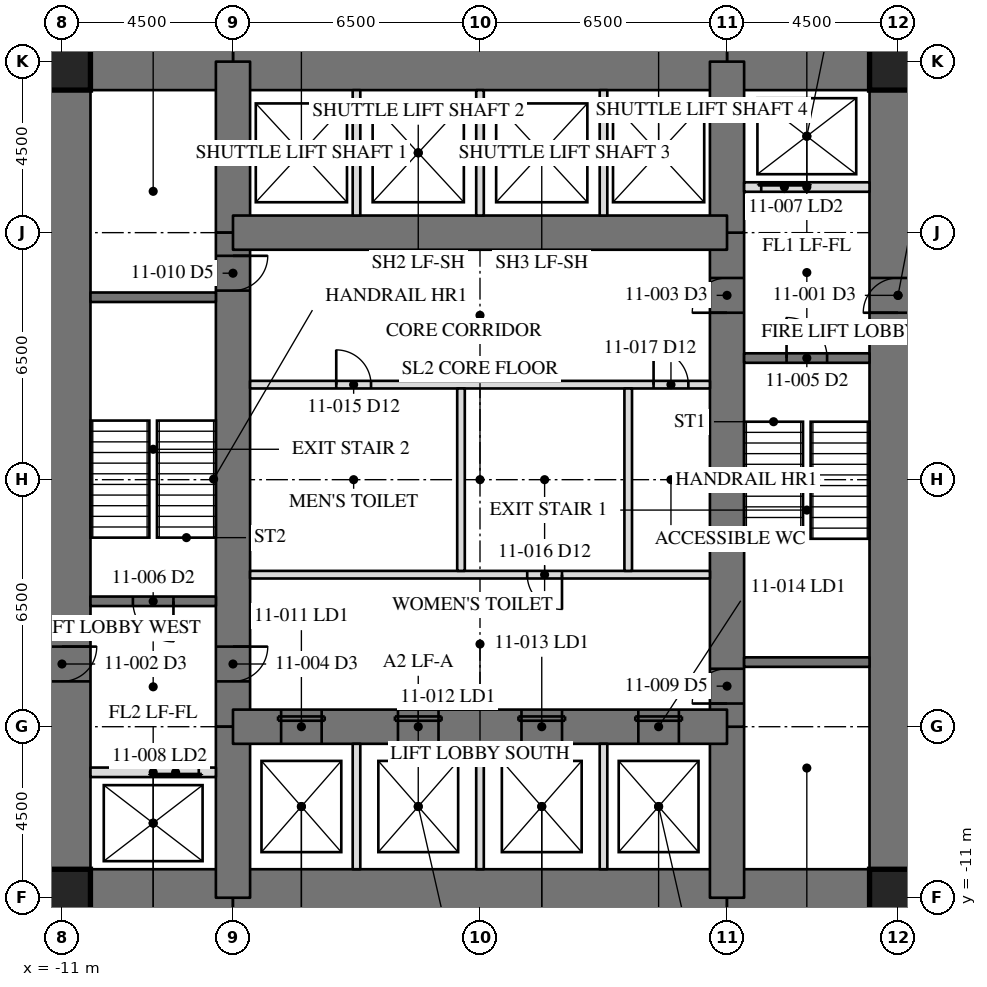
"""IFC4 building model, lengths in metres.
Left out: names, types, materials, properties, quantities, classifications, styles, units other than length and angle.
Written with IfcOpenShell. Run it as: python <this file> out.ifc"""

import sys

from ifc_helpers import new_model, si_unit, direction, frame, frame_2d, origin, origin_2d, place, context, subcontext, project, spatial, rectangle, hollow_rectangle, extrude, element, fill, save


model = new_model("IFC4")
c1 = context("Model", 3, precision=1e-05, world=origin(), true_north=direction((0.0, 1.0)))
c2 = subcontext(c1, "Body", "Model", "MODEL_VIEW")
j1 = project(units=[si_unit("LENGTHUNIT", "METRE"), si_unit("PLANEANGLEUNIT", "RADIAN")], contexts=[c1])
p1 = place(None, origin())
s1 = spatial("IfcSite", under=j1, at=p1, CompositionType="ELEMENT")
p2 = place(p1, origin())
s2 = spatial("IfcBuilding", under=s1, at=p2, CompositionType="ELEMENT")
p3 = place(p2, frame((0.0, 0.0, 48.8)))
s3 = spatial("IfcBuildingStorey", under=s2, at=p3, CompositionType="ELEMENT", Elevation=48.8)
p4 = place(p3, frame((11.0, -11.0, 0.0), z_axis=(0.0, 0.0, 1.0), x_axis=(0.0, 1.0, 0.0)))
e1 = element("IfcWall", 1, at=p4, inside=s3, PredefinedType="SHEAR", context=c2, shape_type="SweptSolid", body=[
    extrude(rectangle(XDim=22.0, YDim=1.5, at=frame_2d((11.0, 0.0))), origin(), (0.0, 0.0, 1.0), 4.1),
])
p5 = place(p4, frame((15.393, 0.0, 0.0)))
e2 = element("IfcOpeningElement", 2, at=p5, cuts=e1, PredefinedType="OPENING", context=c2, shape_type="SweptSolid", body=[
    extrude(rectangle(XDim=0.915, YDim=2.134, at=frame_2d((0.458, 1.067))), frame((0.0, 0.76, 0.0), z_axis=(0.0, -1.0, 0.0), x_axis=(1.0, 0.0, 0.0)), (0.0, 0.0, 1.0), 1.52),
])
p6 = place(p3, frame((-11.0, 11.0, 0.0), z_axis=(0.0, 0.0, 1.0), x_axis=(0.0, -1.0, 0.0)))
e3 = element("IfcWall", 3, at=p6, inside=s3, PredefinedType="SHEAR", context=c2, shape_type="SweptSolid", body=[
    extrude(rectangle(XDim=22.0, YDim=1.5, at=frame_2d((11.0, 0.0))), origin(), (0.0, 0.0, 1.0), 4.1),
])
p7 = place(p6, frame((15.393, 0.0, 0.0)))
e4 = element("IfcOpeningElement", 4, at=p7, cuts=e3, PredefinedType="OPENING", context=c2, shape_type="SweptSolid", body=[
    extrude(rectangle(XDim=0.915, YDim=2.134, at=frame_2d((0.458, 1.067))), frame((0.0, 0.76, 0.0), z_axis=(0.0, -1.0, 0.0), x_axis=(1.0, 0.0, 0.0)), (0.0, 0.0, 1.0), 1.52),
])
p8 = place(p3, frame((11.0, 11.0, 0.0), z_axis=(0.0, 0.0, 1.0), x_axis=(-1.0, 0.0, 0.0)))
e5 = element("IfcWall", 5, at=p8, inside=s3, PredefinedType="SHEAR", context=c2, shape_type="SweptSolid", body=[
    extrude(rectangle(XDim=4.5, YDim=1.5, at=frame_2d((2.25, 0.0))), origin(), (0.0, 0.0, 1.0), 4.1),
])
p9 = place(p3, frame((6.5, 11.0, 0.0), z_axis=(0.0, 0.0, 1.0), x_axis=(-1.0, 0.0, 0.0)))
e6 = element("IfcWall", 6, at=p9, inside=s3, PredefinedType="SHEAR", context=c2, shape_type="SweptSolid", body=[
    extrude(rectangle(XDim=13.0, YDim=1.5, at=frame_2d((6.5, 0.0))), origin(), (0.0, 0.0, 1.0), 4.1),
])
for number, where, z_axis, x_axis in (
    (7, (-6.5, 11.0, 0.0), (0.0, 0.0, 1.0), (-1.0, 0.0, 0.0)),
    (8, (-11.0, -11.0, 0.0), (0.0, 0.0, 1.0), (1.0, 0.0, 0.0)),
):
    element("IfcWall", number, at=place(p3, frame(where, z_axis=z_axis, x_axis=x_axis)), inside=s3, PredefinedType="SHEAR", context=c2, shape_type="SweptSolid", body=[
        extrude(rectangle(XDim=4.5, YDim=1.5, at=frame_2d((2.25, 0.0))), origin(), (0.0, 0.0, 1.0), 4.1),
    ])
p10 = place(p3, frame((-6.5, -11.0, 0.0), z_axis=(0.0, 0.0, 1.0), x_axis=(1.0, 0.0, 0.0)))
e9 = element("IfcWall", 9, at=p10, inside=s3, PredefinedType="SHEAR", context=c2, shape_type="SweptSolid", body=[
    extrude(rectangle(XDim=13.0, YDim=1.5, at=frame_2d((6.5, 0.0))), origin(), (0.0, 0.0, 1.0), 4.1),
])
p11 = place(p3, frame((6.5, -11.0, 0.0), z_axis=(0.0, 0.0, 1.0), x_axis=(1.0, 0.0, 0.0)))
e10 = element("IfcWall", 10, at=p11, inside=s3, PredefinedType="SHEAR", context=c2, shape_type="SweptSolid", body=[
    extrude(rectangle(XDim=4.5, YDim=1.5, at=frame_2d((2.25, 0.0))), origin(), (0.0, 0.0, 1.0), 4.1),
])
p12 = place(p3, frame((6.5, -11.0, 0.0), z_axis=(0.0, 0.0, 1.0), x_axis=(0.0, 1.0, 0.0)))
e11 = element("IfcWall", 11, at=p12, inside=s3, PredefinedType="SHEAR", context=c2, shape_type="SweptSolid", body=[
    extrude(rectangle(XDim=4.5, YDim=0.9, at=frame_2d((2.25, 0.0))), origin(), (0.0, 0.0, 1.0), 4.1),
])
p13 = place(p3, frame((6.5, -6.5, 0.0), z_axis=(0.0, 0.0, 1.0), x_axis=(0.0, 1.0, 0.0)))
e12 = element("IfcWall", 12, at=p13, inside=s3, PredefinedType="SHEAR", context=c2, shape_type="SweptSolid", body=[
    extrude(rectangle(XDim=13.0, YDim=0.9, at=frame_2d((6.5, 0.0))), origin(), (0.0, 0.0, 1.0), 4.1),
])
p14 = place(p13, frame((10.893, 0.0, 0.0)))
e13 = element("IfcOpeningElement", 13, at=p14, cuts=e12, PredefinedType="OPENING", context=c2, shape_type="SweptSolid", body=[
    extrude(rectangle(XDim=0.915, YDim=2.134, at=frame_2d((0.458, 1.067))), frame((0.0, 0.46, 0.0), z_axis=(0.0, -1.0, 0.0), x_axis=(1.0, 0.0, 0.0)), (0.0, 0.0, 1.0), 0.92),
])
p15 = place(p13, frame((0.61, 0.0, 0.0)))
e14 = element("IfcOpeningElement", 14, at=p15, cuts=e12, PredefinedType="OPENING", context=c2, shape_type="SweptSolid", body=[
    extrude(rectangle(XDim=0.915, YDim=2.134, at=frame_2d((0.458, 1.067))), frame((0.0, 0.46, 0.0), z_axis=(0.0, -1.0, 0.0), x_axis=(1.0, 0.0, 0.0)), (0.0, 0.0, 1.0), 0.92),
])
for number, where, z_axis, x_axis in (
    (15, (6.5, 6.5, 0.0), (0.0, 0.0, 1.0), (0.0, 1.0, 0.0)),
    (16, (-6.5, 11.0, 0.0), (0.0, 0.0, 1.0), (0.0, -1.0, 0.0)),
):
    element("IfcWall", number, at=place(p3, frame(where, z_axis=z_axis, x_axis=x_axis)), inside=s3, PredefinedType="SHEAR", context=c2, shape_type="SweptSolid", body=[
        extrude(rectangle(XDim=4.5, YDim=0.9, at=frame_2d((2.25, 0.0))), origin(), (0.0, 0.0, 1.0), 4.1),
    ])
p16 = place(p3, frame((-6.5, 6.5, 0.0), z_axis=(0.0, 0.0, 1.0), x_axis=(0.0, -1.0, 0.0)))
e17 = element("IfcWall", 17, at=p16, inside=s3, PredefinedType="SHEAR", context=c2, shape_type="SweptSolid", body=[
    extrude(rectangle(XDim=13.0, YDim=0.9, at=frame_2d((6.5, 0.0))), origin(), (0.0, 0.0, 1.0), 4.1),
])
p17 = place(p16, frame((10.893, 0.0, 0.0)))
e18 = element("IfcOpeningElement", 18, at=p17, cuts=e17, PredefinedType="OPENING", context=c2, shape_type="SweptSolid", body=[
    extrude(rectangle(XDim=0.915, YDim=2.134, at=frame_2d((0.458, 1.067))), frame((0.0, 0.46, 0.0), z_axis=(0.0, -1.0, 0.0), x_axis=(1.0, 0.0, 0.0)), (0.0, 0.0, 1.0), 0.92),
])
p18 = place(p16, frame((0.61, 0.0, 0.0)))
e19 = element("IfcOpeningElement", 19, at=p18, cuts=e17, PredefinedType="OPENING", context=c2, shape_type="SweptSolid", body=[
    extrude(rectangle(XDim=0.915, YDim=2.134, at=frame_2d((0.458, 1.067))), frame((0.0, 0.46, 0.0), z_axis=(0.0, -1.0, 0.0), x_axis=(1.0, 0.0, 0.0)), (0.0, 0.0, 1.0), 0.92),
])
p19 = place(p3, frame((-6.5, -6.5, 0.0), z_axis=(0.0, 0.0, 1.0), x_axis=(0.0, -1.0, 0.0)))
e20 = element("IfcWall", 20, at=p19, inside=s3, PredefinedType="SHEAR", context=c2, shape_type="SweptSolid", body=[
    extrude(rectangle(XDim=4.5, YDim=0.9, at=frame_2d((2.25, 0.0))), origin(), (0.0, 0.0, 1.0), 4.1),
])
p20 = place(p3, frame((6.5, 6.5, 0.0), z_axis=(0.0, 0.0, 1.0), x_axis=(-1.0, 0.0, 0.0)))
e21 = element("IfcWall", 21, at=p20, inside=s3, PredefinedType="SHEAR", context=c2, shape_type="SweptSolid", body=[
    extrude(rectangle(XDim=13.0, YDim=0.9, at=frame_2d((6.5, 0.0))), origin(), (0.0, 0.0, 1.0), 4.1),
])
p21 = place(p3, frame((-6.5, -6.5, 0.0), z_axis=(0.0, 0.0, 1.0), x_axis=(1.0, 0.0, 0.0)))
e22 = element("IfcWall", 22, at=p21, inside=s3, PredefinedType="SHEAR", context=c2, shape_type="SweptSolid", body=[
    extrude(rectangle(XDim=13.0, YDim=0.9, at=frame_2d((6.5, 0.0))), origin(), (0.0, 0.0, 1.0), 4.1),
])
p22 = place(p21, frame((1.267, 0.0, 0.0)))
e23 = element("IfcOpeningElement", 23, at=p22, cuts=e22, PredefinedType="OPENING", context=c2, shape_type="SweptSolid", body=[
    extrude(rectangle(XDim=1.067, YDim=2.134, at=frame_2d((0.533, 1.067))), frame((0.0, 0.46, 0.0), z_axis=(0.0, -1.0, 0.0), x_axis=(1.0, 0.0, 0.0)), (0.0, 0.0, 1.0), 0.92),
])
p23 = place(p21, frame((4.342, 0.0, 0.0)))
e24 = element("IfcOpeningElement", 24, at=p23, cuts=e22, PredefinedType="OPENING", context=c2, shape_type="SweptSolid", body=[
    extrude(rectangle(XDim=1.067, YDim=2.134, at=frame_2d((0.533, 1.067))), frame((0.0, 0.46, 0.0), z_axis=(0.0, -1.0, 0.0), x_axis=(1.0, 0.0, 0.0)), (0.0, 0.0, 1.0), 0.92),
])
p24 = place(p21, frame((7.592, 0.0, 0.0)))
e25 = element("IfcOpeningElement", 25, at=p24, cuts=e22, PredefinedType="OPENING", context=c2, shape_type="SweptSolid", body=[
    extrude(rectangle(XDim=1.067, YDim=2.134, at=frame_2d((0.533, 1.067))), frame((0.0, 0.46, 0.0), z_axis=(0.0, -1.0, 0.0), x_axis=(1.0, 0.0, 0.0)), (0.0, 0.0, 1.0), 0.92),
])
p25 = place(p21, frame((10.667, 0.0, 0.0)))
e26 = element("IfcOpeningElement", 26, at=p25, cuts=e22, PredefinedType="OPENING", context=c2, shape_type="SweptSolid", body=[
    extrude(rectangle(XDim=1.067, YDim=2.134, at=frame_2d((0.533, 1.067))), frame((0.0, 0.46, 0.0), z_axis=(0.0, -1.0, 0.0), x_axis=(1.0, 0.0, 0.0)), (0.0, 0.0, 1.0), 0.92),
])
for number, where, z_axis, x_axis in (
    (27, (11.0, 11.0, 0.0), (0.0, 0.0, 1.0), (1.0, 0.0, 0.0)),
    (28, (-11.0, 11.0, 0.0), (0.0, 0.0, 1.0), (1.0, 0.0, 0.0)),
    (29, (-11.0, -11.0, 0.0), (0.0, 0.0, 1.0), (1.0, 0.0, 0.0)),
    (30, (11.0, -11.0, 0.0), (0.0, 0.0, 1.0), (1.0, 0.0, 0.0)),
):
    element("IfcColumn", number, at=place(p3, frame(where, z_axis=z_axis, x_axis=x_axis)), inside=s3, PredefinedType="COLUMN", context=c2, shape_type="SweptSolid", body=[
        extrude(hollow_rectangle(XDim=1.499, YDim=1.499, WallThickness=0.102, at=origin_2d()), origin(), (0.0, 0.0, 1.0), 4.1),
    ])
for number, where, z_axis, x_axis in (
    (31, (6.95, -4.8, 0.0), (0.0, 0.0, 1.0), (1.0, 0.0, 0.0)),
    (32, (-6.95, 4.8, 0.0), (0.0, 0.0, 1.0), (-1.0, 0.0, 0.0)),
):
    element("IfcWall", number, at=place(p3, frame(where, z_axis=z_axis, x_axis=x_axis)), inside=s3, PredefinedType="SOLIDWALL", context=c2, shape_type="SweptSolid", body=[
        extrude(rectangle(XDim=3.3, YDim=0.25, at=frame_2d((1.65, 0.0))), origin(), (0.0, 0.0, 1.0), 3.91),
    ])
p26 = place(p3, frame((6.95, 3.2, 0.0), z_axis=(0.0, 0.0, 1.0), x_axis=(1.0, 0.0, 0.0)))
e33 = element("IfcWall", 33, at=p26, inside=s3, PredefinedType="SOLIDWALL", context=c2, shape_type="SweptSolid", body=[
    extrude(rectangle(XDim=3.3, YDim=0.25, at=frame_2d((1.65, 0.0))), origin(), (0.0, 0.0, 1.0), 3.91),
])
p27 = place(p26, frame((1.116, 0.0, 0.0)))
e34 = element("IfcOpeningElement", 34, at=p27, cuts=e33, PredefinedType="OPENING", context=c2, shape_type="SweptSolid", body=[
    extrude(rectangle(XDim=1.067, YDim=2.134, at=frame_2d((0.533, 1.067))), frame((0.0, 0.135, 0.0), z_axis=(0.0, -1.0, 0.0), x_axis=(1.0, 0.0, 0.0)), (0.0, 0.0, 1.0), 0.27),
])
p28 = place(p3, frame((-6.95, -3.2, 0.0), z_axis=(0.0, 0.0, 1.0), x_axis=(-1.0, 0.0, 0.0)))
e35 = element("IfcWall", 35, at=p28, inside=s3, PredefinedType="SOLIDWALL", context=c2, shape_type="SweptSolid", body=[
    extrude(rectangle(XDim=3.3, YDim=0.25, at=frame_2d((1.65, 0.0))), origin(), (0.0, 0.0, 1.0), 3.91),
])
p29 = place(p28, frame((1.116, 0.0, 0.0)))
e36 = element("IfcOpeningElement", 36, at=p29, cuts=e35, PredefinedType="OPENING", context=c2, shape_type="SweptSolid", body=[
    extrude(rectangle(XDim=1.067, YDim=2.134, at=frame_2d((0.533, 1.067))), frame((0.0, 0.135, 0.0), z_axis=(0.0, -1.0, 0.0), x_axis=(1.0, 0.0, 0.0)), (0.0, 0.0, 1.0), 0.27),
])
p30 = place(p3, frame((6.95, 7.7, 0.0), z_axis=(0.0, 0.0, 1.0), x_axis=(1.0, 0.0, 0.0)))
e37 = element("IfcWall", 37, at=p30, inside=s3, PredefinedType="PARTITIONING", context=c2, shape_type="SweptSolid", body=[
    extrude(rectangle(XDim=3.3, YDim=0.25, at=frame_2d((1.65, 0.0))), origin(), (0.0, 0.0, 1.0), 3.91),
])
p31 = place(p30, frame((0.45, 0.0, 0.0)))
e38 = element("IfcOpeningElement", 38, at=p31, cuts=e37, PredefinedType="OPENING", context=c2, shape_type="SweptSolid", body=[
    extrude(rectangle(XDim=1.219, YDim=2.134, at=frame_2d((0.609, 1.067))), frame((0.0, 0.135, 0.0), z_axis=(0.0, -1.0, 0.0), x_axis=(1.0, 0.0, 0.0)), (0.0, 0.0, 1.0), 0.27),
])
p32 = place(p3, frame((-6.95, -7.7, 0.0), z_axis=(0.0, 0.0, 1.0), x_axis=(-1.0, 0.0, 0.0)))
e39 = element("IfcWall", 39, at=p32, inside=s3, PredefinedType="PARTITIONING", context=c2, shape_type="SweptSolid", body=[
    extrude(rectangle(XDim=3.3, YDim=0.25, at=frame_2d((1.65, 0.0))), origin(), (0.0, 0.0, 1.0), 3.91),
])
p33 = place(p32, frame((0.45, 0.0, 0.0)))
e40 = element("IfcOpeningElement", 40, at=p33, cuts=e39, PredefinedType="OPENING", context=c2, shape_type="SweptSolid", body=[
    extrude(rectangle(XDim=1.219, YDim=2.134, at=frame_2d((0.609, 1.067))), frame((0.0, 0.135, 0.0), z_axis=(0.0, -1.0, 0.0), x_axis=(1.0, 0.0, 0.0)), (0.0, 0.0, 1.0), 0.27),
])
p34 = place(p3, frame((-6.05, 2.5, 0.0), z_axis=(0.0, 0.0, 1.0), x_axis=(1.0, 0.0, 0.0)))
e41 = element("IfcWall", 41, at=p34, inside=s3, PredefinedType="PARTITIONING", context=c2, shape_type="SweptSolid", body=[
    extrude(rectangle(XDim=12.1, YDim=0.2, at=frame_2d((6.05, 0.0))), origin(), (0.0, 0.0, 1.0), 3.91),
])
p35 = place(p34, frame((2.268, 0.0, 0.0)))
e42 = element("IfcOpeningElement", 42, at=p35, cuts=e41, PredefinedType="OPENING", context=c2, shape_type="SweptSolid", body=[
    extrude(rectangle(XDim=0.915, YDim=2.134, at=frame_2d((0.458, 1.067))), frame((0.0, 0.11, 0.0), z_axis=(0.0, -1.0, 0.0), x_axis=(1.0, 0.0, 0.0)), (0.0, 0.0, 1.0), 0.22),
])
p36 = place(p34, frame((10.617, 0.0, 0.0)))
e43 = element("IfcOpeningElement", 43, at=p36, cuts=e41, PredefinedType="OPENING", context=c2, shape_type="SweptSolid", body=[
    extrude(rectangle(XDim=0.915, YDim=2.134, at=frame_2d((0.458, 1.067))), frame((0.0, 0.11, 0.0), z_axis=(0.0, -1.0, 0.0), x_axis=(1.0, 0.0, 0.0)), (0.0, 0.0, 1.0), 0.22),
])
p37 = place(p3, frame((6.05, -2.5, 0.0), z_axis=(0.0, 0.0, 1.0), x_axis=(-1.0, 0.0, 0.0)))
e44 = element("IfcWall", 44, at=p37, inside=s3, PredefinedType="PARTITIONING", context=c2, shape_type="SweptSolid", body=[
    extrude(rectangle(XDim=12.1, YDim=0.2, at=frame_2d((6.05, 0.0))), origin(), (0.0, 0.0, 1.0), 3.91),
])
p38 = place(p37, frame((3.893, 0.0, 0.0)))
e45 = element("IfcOpeningElement", 45, at=p38, cuts=e44, PredefinedType="OPENING", context=c2, shape_type="SweptSolid", body=[
    extrude(rectangle(XDim=0.915, YDim=2.134, at=frame_2d((0.458, 1.067))), frame((0.0, 0.11, 0.0), z_axis=(0.0, -1.0, 0.0), x_axis=(1.0, 0.0, 0.0)), (0.0, 0.0, 1.0), 0.22),
])
for number, where, z_axis, x_axis in (
    (46, (-3.25, 6.95, 0.0), (0.0, 0.0, 1.0), (0.0, 1.0, 0.0)),
    (47, (0.0, 6.95, 0.0), (0.0, 0.0, 1.0), (0.0, 1.0, 0.0)),
    (48, (3.25, 6.95, 0.0), (0.0, 0.0, 1.0), (0.0, 1.0, 0.0)),
    (49, (-3.25, -10.25, 0.0), (0.0, 0.0, 1.0), (0.0, 1.0, 0.0)),
    (50, (0.0, -10.25, 0.0), (0.0, 0.0, 1.0), (0.0, 1.0, 0.0)),
    (51, (3.25, -10.25, 0.0), (0.0, 0.0, 1.0), (0.0, 1.0, 0.0)),
):
    element("IfcWall", number, at=place(p3, frame(where, z_axis=z_axis, x_axis=x_axis)), inside=s3, PredefinedType="PARTITIONING", context=c2, shape_type="SweptSolid", body=[
        extrude(rectangle(XDim=3.3, YDim=0.2, at=frame_2d((1.65, 0.0))), origin(), (0.0, 0.0, 1.0), 3.91),
    ])
for number, where, z_axis, x_axis in (
    (52, (-0.5, -2.4, 0.0), (0.0, 0.0, 1.0), (0.0, 1.0, 0.0)),
    (53, (3.9, -2.4, 0.0), (0.0, 0.0, 1.0), (0.0, 1.0, 0.0)),
):
    element("IfcWall", number, at=place(p3, frame(where, z_axis=z_axis, x_axis=x_axis)), inside=s3, PredefinedType="PARTITIONING", context=c2, shape_type="SweptSolid", body=[
        extrude(rectangle(XDim=4.8, YDim=0.2, at=frame_2d((2.4, 0.0))), origin(), (0.0, 0.0, 1.0), 3.91),
    ])
p39 = place(p14, origin())
e54 = element("IfcDoor", 54, at=p39, inside=s3, OperationType="SINGLE_SWING_RIGHT", PredefinedType="DOOR", context=c2, shape_type="SweptSolid", body=[
    extrude(rectangle(XDim=0.915, YDim=2.134, at=frame_2d((0.458, 1.067))), frame((0.0, -0.375, 0.0), z_axis=(0.0, -1.0, 0.0), x_axis=(1.0, 0.0, 0.0)), (0.0, 0.0, 1.0), 0.05),
])
fill(e13, e54)
p40 = place(p17, origin())
e55 = element("IfcDoor", 55, at=p40, inside=s3, OperationType="SINGLE_SWING_RIGHT", PredefinedType="DOOR", context=c2, shape_type="SweptSolid", body=[
    extrude(rectangle(XDim=0.915, YDim=2.134, at=frame_2d((0.458, 1.067))), frame((0.0, -0.375, 0.0), z_axis=(0.0, -1.0, 0.0), x_axis=(1.0, 0.0, 0.0)), (0.0, 0.0, 1.0), 0.05),
])
fill(e18, e55)
p41 = place(p27, origin())
e56 = element("IfcDoor", 56, at=p41, inside=s3, OperationType="SINGLE_SWING_LEFT", PredefinedType="DOOR", context=c2, shape_type="SweptSolid", body=[
    extrude(rectangle(XDim=1.067, YDim=2.134, at=frame_2d((0.533, 1.067))), frame((0.0, 0.025, 0.0), z_axis=(0.0, -1.0, 0.0), x_axis=(1.0, 0.0, 0.0)), (0.0, 0.0, 1.0), 0.05),
])
fill(e34, e56)
p42 = place(p29, origin())
e57 = element("IfcDoor", 57, at=p42, inside=s3, OperationType="SINGLE_SWING_LEFT", PredefinedType="DOOR", context=c2, shape_type="SweptSolid", body=[
    extrude(rectangle(XDim=1.067, YDim=2.134, at=frame_2d((0.533, 1.067))), frame((0.0, 0.025, 0.0), z_axis=(0.0, -1.0, 0.0), x_axis=(1.0, 0.0, 0.0)), (0.0, 0.0, 1.0), 0.05),
])
fill(e36, e57)
p43 = place(p31, origin())
e58 = element("IfcDoor", 58, at=p43, inside=s3, OperationType="SLIDING_TO_LEFT", PredefinedType="DOOR", context=c2, shape_type="SweptSolid", body=[
    extrude(rectangle(XDim=1.219, YDim=2.134, at=frame_2d((0.609, 1.067))), frame((0.0, 0.025, 0.0), z_axis=(0.0, -1.0, 0.0), x_axis=(1.0, 0.0, 0.0)), (0.0, 0.0, 1.0), 0.05),
])
fill(e38, e58)
p44 = place(p33, origin())
e59 = element("IfcDoor", 59, at=p44, inside=s3, OperationType="SLIDING_TO_LEFT", PredefinedType="DOOR", context=c2, shape_type="SweptSolid", body=[
    extrude(rectangle(XDim=1.219, YDim=2.134, at=frame_2d((0.609, 1.067))), frame((0.0, 0.025, 0.0), z_axis=(0.0, -1.0, 0.0), x_axis=(1.0, 0.0, 0.0)), (0.0, 0.0, 1.0), 0.05),
])
fill(e40, e59)
p45 = place(p15, origin())
e60 = element("IfcDoor", 60, at=p45, inside=s3, OperationType="SINGLE_SWING_RIGHT", PredefinedType="DOOR", context=c2, shape_type="SweptSolid", body=[
    extrude(rectangle(XDim=0.915, YDim=2.134, at=frame_2d((0.458, 1.067))), frame((0.0, -0.375, 0.0), z_axis=(0.0, -1.0, 0.0), x_axis=(1.0, 0.0, 0.0)), (0.0, 0.0, 1.0), 0.05),
])
fill(e14, e60)
p46 = place(p18, origin())
e61 = element("IfcDoor", 61, at=p46, inside=s3, OperationType="SINGLE_SWING_RIGHT", PredefinedType="DOOR", context=c2, shape_type="SweptSolid", body=[
    extrude(rectangle(XDim=0.915, YDim=2.134, at=frame_2d((0.458, 1.067))), frame((0.0, -0.375, 0.0), z_axis=(0.0, -1.0, 0.0), x_axis=(1.0, 0.0, 0.0)), (0.0, 0.0, 1.0), 0.05),
])
fill(e19, e61)
p47 = place(p22, origin())
e62 = element("IfcDoor", 62, at=p47, inside=s3, OperationType="SLIDING_TO_LEFT", PredefinedType="DOOR", context=c2, shape_type="SweptSolid", body=[
    extrude(rectangle(XDim=1.067, YDim=2.134, at=frame_2d((0.533, 1.067))), frame((0.0, -0.375, 0.0), z_axis=(0.0, -1.0, 0.0), x_axis=(1.0, 0.0, 0.0)), (0.0, 0.0, 1.0), 0.05),
])
fill(e23, e62)
p48 = place(p23, origin())
e63 = element("IfcDoor", 63, at=p48, inside=s3, OperationType="SLIDING_TO_LEFT", PredefinedType="DOOR", context=c2, shape_type="SweptSolid", body=[
    extrude(rectangle(XDim=1.067, YDim=2.134, at=frame_2d((0.533, 1.067))), frame((0.0, -0.375, 0.0), z_axis=(0.0, -1.0, 0.0), x_axis=(1.0, 0.0, 0.0)), (0.0, 0.0, 1.0), 0.05),
])
fill(e24, e63)
p49 = place(p24, origin())
e64 = element("IfcDoor", 64, at=p49, inside=s3, OperationType="SLIDING_TO_LEFT", PredefinedType="DOOR", context=c2, shape_type="SweptSolid", body=[
    extrude(rectangle(XDim=1.067, YDim=2.134, at=frame_2d((0.533, 1.067))), frame((0.0, -0.375, 0.0), z_axis=(0.0, -1.0, 0.0), x_axis=(1.0, 0.0, 0.0)), (0.0, 0.0, 1.0), 0.05),
])
fill(e25, e64)
p50 = place(p25, origin())
e65 = element("IfcDoor", 65, at=p50, inside=s3, OperationType="SLIDING_TO_LEFT", PredefinedType="DOOR", context=c2, shape_type="SweptSolid", body=[
    extrude(rectangle(XDim=1.067, YDim=2.134, at=frame_2d((0.533, 1.067))), frame((0.0, -0.375, 0.0), z_axis=(0.0, -1.0, 0.0), x_axis=(1.0, 0.0, 0.0)), (0.0, 0.0, 1.0), 0.05),
])
fill(e26, e65)
p51 = place(p35, origin())
e66 = element("IfcDoor", 66, at=p51, inside=s3, OperationType="SINGLE_SWING_LEFT", PredefinedType="DOOR", context=c2, shape_type="SweptSolid", body=[
    extrude(rectangle(XDim=0.915, YDim=2.134, at=frame_2d((0.458, 1.067))), frame((0.0, 0.025, 0.0), z_axis=(0.0, -1.0, 0.0), x_axis=(1.0, 0.0, 0.0)), (0.0, 0.0, 1.0), 0.05),
])
fill(e42, e66)
p52 = place(p38, origin())
e67 = element("IfcDoor", 67, at=p52, inside=s3, OperationType="SINGLE_SWING_LEFT", PredefinedType="DOOR", context=c2, shape_type="SweptSolid", body=[
    extrude(rectangle(XDim=0.915, YDim=2.134, at=frame_2d((0.458, 1.067))), frame((0.0, 0.025, 0.0), z_axis=(0.0, -1.0, 0.0), x_axis=(1.0, 0.0, 0.0)), (0.0, 0.0, 1.0), 0.05),
])
fill(e45, e67)
p53 = place(p36, origin())
e68 = element("IfcDoor", 68, at=p53, inside=s3, OperationType="SINGLE_SWING_LEFT", PredefinedType="DOOR", context=c2, shape_type="SweptSolid", body=[
    extrude(rectangle(XDim=0.915, YDim=2.134, at=frame_2d((0.458, 1.067))), frame((0.0, 0.025, 0.0), z_axis=(0.0, -1.0, 0.0), x_axis=(1.0, 0.0, 0.0)), (0.0, 0.0, 1.0), 0.05),
])
fill(e43, e68)
save(model, sys.argv[1])
